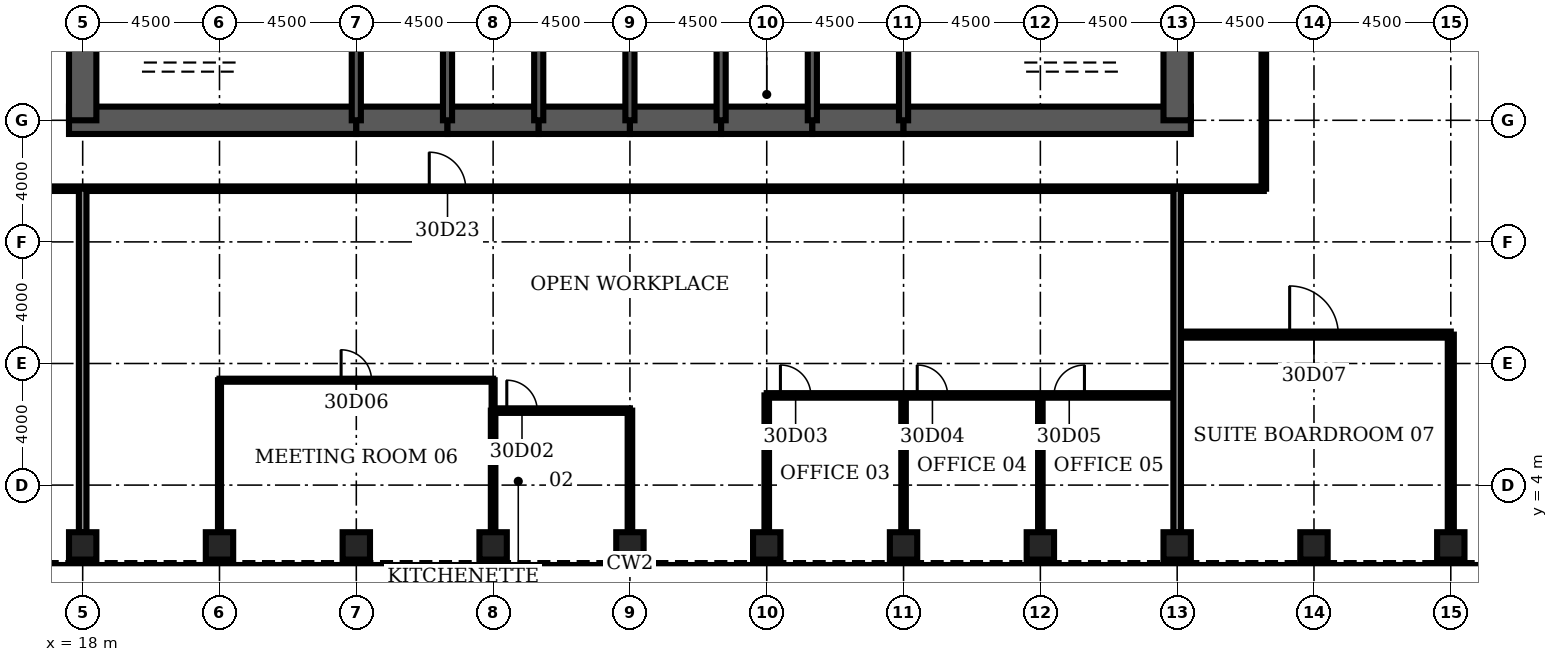
"""IFC4 building model, lengths in metres.
Left out: names, types, materials, properties, quantities, classifications, styles, units other than length and angle.
Written with IfcOpenShell. Run it as: python <this file> out.ifc"""

import sys

from ifc_helpers import new_model, si_unit, direction, frame, frame_2d, origin, origin_2d, place, context, subcontext, project, spatial, rectangle, hollow_rectangle, extrude, element, fill, save


model = new_model("IFC4")
c1 = context("Model", 3, precision=1e-05, world=origin(), true_north=direction((0.0, 1.0)))
c2 = subcontext(c1, "Body", "Model", "MODEL_VIEW")
j1 = project(units=[si_unit("LENGTHUNIT", "METRE"), si_unit("PLANEANGLEUNIT", "RADIAN")], contexts=[c1])
p1 = place(None, origin())
s1 = spatial("IfcSite", under=j1, at=p1, CompositionType="ELEMENT")
p2 = place(p1, origin())
s2 = spatial("IfcBuilding", under=s1, at=p2, CompositionType="ELEMENT")
p3 = place(p2, frame((0.0, 0.0, 138.3)))
s3 = spatial("IfcBuildingStorey", under=s2, at=p3, CompositionType="ELEMENT", Elevation=138.3)
for number, where, z_axis, x_axis in (
    (1, (18.0, 2.0, 0.0), (0.0, 0.0, 1.0), (0.0, 1.0, 0.0)),
    (2, (22.5, 2.0, 0.0), (0.0, 0.0, 1.0), (0.0, 1.0, 0.0)),
    (3, (27.0, 2.0, 0.0), (0.0, 0.0, 1.0), (0.0, 1.0, 0.0)),
    (4, (31.5, 2.0, 0.0), (0.0, 0.0, 1.0), (0.0, 1.0, 0.0)),
    (5, (36.0, 2.0, 0.0), (0.0, 0.0, 1.0), (0.0, 1.0, 0.0)),
    (6, (40.5, 2.0, 0.0), (0.0, 0.0, 1.0), (0.0, 1.0, 0.0)),
    (7, (45.0, 2.0, 0.0), (0.0, 0.0, 1.0), (0.0, 1.0, 0.0)),
    (8, (49.5, 2.0, 0.0), (0.0, 0.0, 1.0), (0.0, 1.0, 0.0)),
    (9, (54.0, 2.0, 0.0), (0.0, 0.0, 1.0), (0.0, 1.0, 0.0)),
    (10, (58.5, 2.0, 0.0), (0.0, 0.0, 1.0), (0.0, 1.0, 0.0)),
    (11, (63.0, 2.0, 0.0), (0.0, 0.0, 1.0), (0.0, 1.0, 0.0)),
):
    element("IfcColumn", number, at=place(p3, frame(where, z_axis=z_axis, x_axis=x_axis)), inside=s3, PredefinedType="COLUMN", context=c2, shape_type="SweptSolid", body=[
        extrude(hollow_rectangle(XDim=0.9, YDim=0.9, WallThickness=0.1, at=origin_2d()), origin(), (0.0, 0.0, 1.0), 4.2),
    ])
p4 = place(p3, frame((17.55, 16.0, 0.0), z_axis=(0.0, 0.0, 1.0), x_axis=(1.0, 0.0, 0.0)))
e12 = element("IfcWall", 12, at=p4, inside=s3, PredefinedType="SHEAR", context=c2, shape_type="SweptSolid", body=[
    extrude(rectangle(XDim=9.45, YDim=0.9, at=frame_2d((4.725, 0.0))), origin(), (0.0, 0.0, 1.0), 4.2),
])
for number, where, z_axis, x_axis in (
    (13, (27.0, 16.0, 0.0), (0.0, 0.0, 1.0), (1.0, 0.0, 0.0)),
    (14, (30.0, 16.0, 0.0), (0.0, 0.0, 1.0), (1.0, 0.0, 0.0)),
    (15, (33.0, 16.0, 0.0), (0.0, 0.0, 1.0), (1.0, 0.0, 0.0)),
    (16, (36.0, 16.0, 0.0), (0.0, 0.0, 1.0), (1.0, 0.0, 0.0)),
    (17, (39.0, 16.0, 0.0), (0.0, 0.0, 1.0), (1.0, 0.0, 0.0)),
    (18, (42.0, 16.0, 0.0), (0.0, 0.0, 1.0), (1.0, 0.0, 0.0)),
):
    element("IfcWall", number, at=place(p3, frame(where, z_axis=z_axis, x_axis=x_axis)), inside=s3, PredefinedType="SHEAR", context=c2, shape_type="SweptSolid", body=[
        extrude(rectangle(XDim=3.0, YDim=0.9, at=frame_2d((1.5, 0.0))), origin(), (0.0, 0.0, 1.0), 4.2),
    ])
p5 = place(p3, frame((45.0, 16.0, 0.0), z_axis=(0.0, 0.0, 1.0), x_axis=(1.0, 0.0, 0.0)))
e19 = element("IfcWall", 19, at=p5, inside=s3, PredefinedType="SHEAR", context=c2, shape_type="SweptSolid", body=[
    extrude(rectangle(XDim=9.45, YDim=0.9, at=frame_2d((4.725, 0.0))), origin(), (0.0, 0.0, 1.0), 4.2),
])
for number, where, z_axis, x_axis in (
    (20, (18.0, 19.2, 0.0), (0.0, 0.0, 1.0), (0.0, -1.0, 0.0)),
    (21, (54.0, 16.0, 0.0), (0.0, 0.0, 1.0), (0.0, 1.0, 0.0)),
):
    element("IfcWall", number, at=place(p3, frame(where, z_axis=z_axis, x_axis=x_axis)), inside=s3, PredefinedType="SHEAR", context=c2, shape_type="SweptSolid", body=[
        extrude(rectangle(XDim=3.2, YDim=0.9, at=frame_2d((1.6, 0.0))), origin(), (0.0, 0.0, 1.0), 4.2),
    ])
for number, where, z_axis, x_axis in (
    (22, (27.0, 16.0, 0.0), (0.0, 0.0, 1.0), (0.0, 1.0, 0.0)),
    (23, (30.0, 16.0, 0.0), (0.0, 0.0, 1.0), (0.0, 1.0, 0.0)),
    (24, (33.0, 16.0, 0.0), (0.0, 0.0, 1.0), (0.0, 1.0, 0.0)),
    (25, (36.0, 16.0, 0.0), (0.0, 0.0, 1.0), (0.0, 1.0, 0.0)),
    (26, (39.0, 16.0, 0.0), (0.0, 0.0, 1.0), (0.0, 1.0, 0.0)),
    (27, (42.0, 16.0, 0.0), (0.0, 0.0, 1.0), (0.0, 1.0, 0.0)),
    (28, (45.0, 16.0, 0.0), (0.0, 0.0, 1.0), (0.0, 1.0, 0.0)),
):
    element("IfcWall", number, at=place(p3, frame(where, z_axis=z_axis, x_axis=x_axis)), inside=s3, PredefinedType="SOLIDWALL", context=c2, shape_type="SweptSolid", body=[
        extrude(rectangle(XDim=3.2, YDim=0.3, at=frame_2d((1.6, 0.0))), origin(), (0.0, 0.0, 1.0), 4.2),
    ])
p6 = place(p3, frame((39.15, 17.4, 0.0), z_axis=(0.0, 0.0, 1.0), x_axis=(1.0, 0.0, 0.0)))
e29 = element("IfcWall", 29, at=p6, inside=s3, PredefinedType="SOLIDWALL", context=c2, shape_type="SweptSolid", body=[
    extrude(rectangle(XDim=2.7, YDim=0.3, at=frame_2d((1.35, 0.0))), origin(), (0.0, 0.0, 1.0), 4.04),
])
p7 = place(p6, frame((0.85, 0.0, 0.0)))
e30 = element("IfcOpeningElement", 30, at=p7, cuts=e29, PredefinedType="OPENING", context=c2, shape_type="SweptSolid", body=[
    extrude(rectangle(XDim=1.0, YDim=2.1, at=frame_2d((0.5, 1.05))), frame((0.0, 0.16, 0.0), z_axis=(0.0, -1.0, 0.0), x_axis=(1.0, 0.0, 0.0)), (0.0, 0.0, 1.0), 0.32),
])
p8 = place(p3, frame((31.5, 6.45, 0.0), z_axis=(0.0, 0.0, 1.0), x_axis=(1.0, 0.0, 0.0)))
e31 = element("IfcWall", 31, at=p8, inside=s3, PredefinedType="PARTITIONING", context=c2, shape_type="SweptSolid", body=[
    extrude(rectangle(XDim=4.5, YDim=0.15, at=frame_2d((2.25, 0.0))), origin(), (0.0, 0.0, 1.0), 3.0),
])
p9 = place(p8, frame((0.45, 0.0, 0.0)))
e32 = element("IfcOpeningElement", 32, at=p9, cuts=e31, PredefinedType="OPENING", context=c2, shape_type="SweptSolid", body=[
    extrude(rectangle(XDim=1.0, YDim=2.1, at=frame_2d((0.5, 1.05))), frame((0.0, 0.085, 0.0), z_axis=(0.0, -1.0, 0.0), x_axis=(1.0, 0.0, 0.0)), (0.0, 0.0, 1.0), 0.17),
])
p10 = place(p3, frame((40.5, 6.95, 0.0), z_axis=(0.0, 0.0, 1.0), x_axis=(1.0, 0.0, 0.0)))
e33 = element("IfcWall", 33, at=p10, inside=s3, PredefinedType="PARTITIONING", context=c2, shape_type="SweptSolid", body=[
    extrude(rectangle(XDim=13.5, YDim=0.15, at=frame_2d((6.75, 0.0))), origin(), (0.0, 0.0, 1.0), 3.0),
])
p11 = place(p10, frame((0.45, 0.0, 0.0)))
e34 = element("IfcOpeningElement", 34, at=p11, cuts=e33, PredefinedType="OPENING", context=c2, shape_type="SweptSolid", body=[
    extrude(rectangle(XDim=1.0, YDim=2.1, at=frame_2d((0.5, 1.05))), frame((0.0, 0.085, 0.0), z_axis=(0.0, -1.0, 0.0), x_axis=(1.0, 0.0, 0.0)), (0.0, 0.0, 1.0), 0.17),
])
p12 = place(p10, frame((4.95, 0.0, 0.0)))
e35 = element("IfcOpeningElement", 35, at=p12, cuts=e33, PredefinedType="OPENING", context=c2, shape_type="SweptSolid", body=[
    extrude(rectangle(XDim=1.0, YDim=2.1, at=frame_2d((0.5, 1.05))), frame((0.0, 0.085, 0.0), z_axis=(0.0, -1.0, 0.0), x_axis=(1.0, 0.0, 0.0)), (0.0, 0.0, 1.0), 0.17),
])
p13 = place(p10, frame((9.45, 0.0, 0.0)))
e36 = element("IfcOpeningElement", 36, at=p13, cuts=e33, PredefinedType="OPENING", context=c2, shape_type="SweptSolid", body=[
    extrude(rectangle(XDim=1.0, YDim=2.1, at=frame_2d((0.5, 1.05))), frame((0.0, 0.085, 0.0), z_axis=(0.0, -1.0, 0.0), x_axis=(1.0, 0.0, 0.0)), (0.0, 0.0, 1.0), 0.17),
])
p14 = place(p3, frame((22.5, 7.45, 0.0), z_axis=(0.0, 0.0, 1.0), x_axis=(1.0, 0.0, 0.0)))
e37 = element("IfcWall", 37, at=p14, inside=s3, PredefinedType="PARTITIONING", context=c2, shape_type="SweptSolid", body=[
    extrude(rectangle(XDim=9.0, YDim=0.1, at=frame_2d((4.5, 0.0))), origin(), (0.0, 0.0, 1.0), 3.0),
])
p15 = place(p14, frame((4.0, 0.0, 0.0)))
e38 = element("IfcOpeningElement", 38, at=p15, cuts=e37, PredefinedType="OPENING", context=c2, shape_type="SweptSolid", body=[
    extrude(rectangle(XDim=1.0, YDim=2.1, at=frame_2d((0.5, 1.05))), frame((0.0, 0.06, 0.0), z_axis=(0.0, -1.0, 0.0), x_axis=(1.0, 0.0, 0.0)), (0.0, 0.0, 1.0), 0.12),
])
p16 = place(p3, frame((54.0, 8.95, 0.0), z_axis=(0.0, 0.0, 1.0), x_axis=(1.0, 0.0, 0.0)))
e39 = element("IfcWall", 39, at=p16, inside=s3, PredefinedType="PARTITIONING", context=c2, shape_type="SweptSolid", body=[
    extrude(rectangle(XDim=9.0, YDim=0.2, at=frame_2d((4.5, 0.0))), origin(), (0.0, 0.0, 1.0), 3.0),
])
p17 = place(p16, frame((3.7, 0.0, 0.0)))
e40 = element("IfcOpeningElement", 40, at=p17, cuts=e39, PredefinedType="OPENING", context=c2, shape_type="SweptSolid", body=[
    extrude(rectangle(XDim=1.6, YDim=2.1, at=frame_2d((0.8, 1.05))), frame((0.0, 0.11, 0.0), z_axis=(0.0, -1.0, 0.0), x_axis=(1.0, 0.0, 0.0)), (0.0, 0.0, 1.0), 0.22),
])
p18 = place(p3, frame((15.15, 13.75, 0.0), z_axis=(0.0, 0.0, 1.0), x_axis=(1.0, 0.0, 0.0)))
e41 = element("IfcWall", 41, at=p18, inside=s3, PredefinedType="PARTITIONING", context=c2, shape_type="SweptSolid", body=[
    extrude(rectangle(XDim=41.7, YDim=0.15, at=frame_2d((20.85, 0.0))), origin(), (0.0, 0.0, 1.0), 3.0),
])
p19 = place(p18, frame((14.25, 0.0, 0.0)))
e42 = element("IfcOpeningElement", 42, at=p19, cuts=e41, PredefinedType="OPENING", context=c2, shape_type="SweptSolid", body=[
    extrude(rectangle(XDim=1.2, YDim=2.1, at=frame_2d((0.6, 1.05))), frame((0.0, 0.085, 0.0), z_axis=(0.0, -1.0, 0.0), x_axis=(1.0, 0.0, 0.0)), (0.0, 0.0, 1.0), 0.17),
])
p20 = place(p3, frame((18.0, 2.45, 0.0), z_axis=(0.0, 0.0, 1.0), x_axis=(0.0, 1.0, 0.0)))
e43 = element("IfcWall", 43, at=p20, inside=s3, PredefinedType="PARTITIONING", context=c2, shape_type="SweptSolid", body=[
    extrude(rectangle(XDim=11.3, YDim=0.25, at=frame_2d((5.65, 0.0))), origin(), (0.0, 0.0, 1.0), 3.0),
])
p21 = place(p3, frame((22.5, 2.45, 0.0), z_axis=(0.0, 0.0, 1.0), x_axis=(0.0, 1.0, 0.0)))
e44 = element("IfcWall", 44, at=p21, inside=s3, PredefinedType="PARTITIONING", context=c2, shape_type="SweptSolid", body=[
    extrude(rectangle(XDim=5.0, YDim=0.1, at=frame_2d((2.5, 0.0))), origin(), (0.0, 0.0, 1.0), 3.0),
])
p22 = place(p3, frame((31.5, 2.45, 0.0), z_axis=(0.0, 0.0, 1.0), x_axis=(0.0, 1.0, 0.0)))
e45 = element("IfcWall", 45, at=p22, inside=s3, PredefinedType="PARTITIONING", context=c2, shape_type="SweptSolid", body=[
    extrude(rectangle(XDim=4.0, YDim=0.15, at=frame_2d((2.0, 0.0))), origin(), (0.0, 0.0, 1.0), 3.0),
])
p23 = place(p3, frame((31.5, 6.45, 0.0), z_axis=(0.0, 0.0, 1.0), x_axis=(0.0, 1.0, 0.0)))
e46 = element("IfcWall", 46, at=p23, inside=s3, PredefinedType="PARTITIONING", context=c2, shape_type="SweptSolid", body=[
    extrude(rectangle(XDim=1.0, YDim=0.1, at=frame_2d((0.5, 0.0))), origin(), (0.0, 0.0, 1.0), 3.0),
])
p24 = place(p3, frame((36.0, 2.45, 0.0), z_axis=(0.0, 0.0, 1.0), x_axis=(0.0, 1.0, 0.0)))
e47 = element("IfcWall", 47, at=p24, inside=s3, PredefinedType="PARTITIONING", context=c2, shape_type="SweptSolid", body=[
    extrude(rectangle(XDim=4.0, YDim=0.15, at=frame_2d((2.0, 0.0))), origin(), (0.0, 0.0, 1.0), 3.0),
])
for number, where, z_axis, x_axis in (
    (48, (40.5, 2.45, 0.0), (0.0, 0.0, 1.0), (0.0, 1.0, 0.0)),
    (49, (45.0, 2.45, 0.0), (0.0, 0.0, 1.0), (0.0, 1.0, 0.0)),
    (50, (49.5, 2.45, 0.0), (0.0, 0.0, 1.0), (0.0, 1.0, 0.0)),
):
    element("IfcWall", number, at=place(p3, frame(where, z_axis=z_axis, x_axis=x_axis)), inside=s3, PredefinedType="PARTITIONING", context=c2, shape_type="SweptSolid", body=[
        extrude(rectangle(XDim=4.5, YDim=0.15, at=frame_2d((2.25, 0.0))), origin(), (0.0, 0.0, 1.0), 3.0),
    ])
p25 = place(p3, frame((54.0, 2.45, 0.0), z_axis=(0.0, 0.0, 1.0), x_axis=(0.0, 1.0, 0.0)))
e51 = element("IfcWall", 51, at=p25, inside=s3, PredefinedType="PARTITIONING", context=c2, shape_type="SweptSolid", body=[
    extrude(rectangle(XDim=11.3, YDim=0.25, at=frame_2d((5.65, 0.0))), origin(), (0.0, 0.0, 1.0), 3.0),
])
p26 = place(p3, frame((56.85, 13.75, 0.0), z_axis=(0.0, 0.0, 1.0), x_axis=(0.0, 1.0, 0.0)))
e52 = element("IfcWall", 52, at=p26, inside=s3, PredefinedType="PARTITIONING", context=c2, shape_type="SweptSolid", body=[
    extrude(rectangle(XDim=20.5, YDim=0.15, at=frame_2d((10.25, 0.0))), origin(), (0.0, 0.0, 1.0), 3.0),
])
p27 = place(p26, frame((9.65, 0.0, 0.0)))
e53 = element("IfcOpeningElement", 53, at=p27, cuts=e52, PredefinedType="OPENING", context=c2, shape_type="SweptSolid", body=[
    extrude(rectangle(XDim=1.2, YDim=2.1, at=frame_2d((0.6, 1.05))), frame((0.0, 0.085, 0.0), z_axis=(0.0, -1.0, 0.0), x_axis=(1.0, 0.0, 0.0)), (0.0, 0.0, 1.0), 0.17),
])
p28 = place(p3, frame((63.0, 2.45, 0.0), z_axis=(0.0, 0.0, 1.0), x_axis=(0.0, 1.0, 0.0)))
e54 = element("IfcWall", 54, at=p28, inside=s3, PredefinedType="PARTITIONING", context=c2, shape_type="SweptSolid", body=[
    extrude(rectangle(XDim=6.5, YDim=0.2, at=frame_2d((3.25, 0.0))), origin(), (0.0, 0.0, 1.0), 3.0),
])
p29 = place(p7, origin())
e55 = element("IfcDoor", 55, at=p29, inside=s3, OperationType="SINGLE_SWING_LEFT", PredefinedType="DOOR", context=c2, shape_type="SweptSolid", body=[
    extrude(rectangle(XDim=1.0, YDim=2.1, at=frame_2d((0.5, 1.05))), frame((0.0, 0.025, 0.0), z_axis=(0.0, -1.0, 0.0), x_axis=(1.0, 0.0, 0.0)), (0.0, 0.0, 1.0), 0.05),
])
fill(e30, e55)
p30 = place(p9, origin())
e56 = element("IfcDoor", 56, at=p30, inside=s3, OperationType="SINGLE_SWING_LEFT", PredefinedType="DOOR", context=c2, shape_type="SweptSolid", body=[
    extrude(rectangle(XDim=1.0, YDim=2.1, at=frame_2d((0.5, 1.05))), frame((0.0, 0.025, 0.0), z_axis=(0.0, -1.0, 0.0), x_axis=(1.0, 0.0, 0.0)), (0.0, 0.0, 1.0), 0.05),
])
fill(e32, e56)
p31 = place(p11, origin())
e57 = element("IfcDoor", 57, at=p31, inside=s3, OperationType="SINGLE_SWING_LEFT", PredefinedType="DOOR", context=c2, shape_type="SweptSolid", body=[
    extrude(rectangle(XDim=1.0, YDim=2.1, at=frame_2d((0.5, 1.05))), frame((0.0, 0.025, 0.0), z_axis=(0.0, -1.0, 0.0), x_axis=(1.0, 0.0, 0.0)), (0.0, 0.0, 1.0), 0.05),
])
fill(e34, e57)
p32 = place(p12, origin())
e58 = element("IfcDoor", 58, at=p32, inside=s3, OperationType="SINGLE_SWING_LEFT", PredefinedType="DOOR", context=c2, shape_type="SweptSolid", body=[
    extrude(rectangle(XDim=1.0, YDim=2.1, at=frame_2d((0.5, 1.05))), frame((0.0, 0.025, 0.0), z_axis=(0.0, -1.0, 0.0), x_axis=(1.0, 0.0, 0.0)), (0.0, 0.0, 1.0), 0.05),
])
fill(e35, e58)
p33 = place(p13, origin())
e59 = element("IfcDoor", 59, at=p33, inside=s3, OperationType="SINGLE_SWING_RIGHT", PredefinedType="DOOR", context=c2, shape_type="SweptSolid", body=[
    extrude(rectangle(XDim=1.0, YDim=2.1, at=frame_2d((0.5, 1.05))), frame((0.0, 0.025, 0.0), z_axis=(0.0, -1.0, 0.0), x_axis=(1.0, 0.0, 0.0)), (0.0, 0.0, 1.0), 0.05),
])
fill(e36, e59)
p34 = place(p15, origin())
e60 = element("IfcDoor", 60, at=p34, inside=s3, OperationType="SINGLE_SWING_LEFT", PredefinedType="DOOR", context=c2, shape_type="SweptSolid", body=[
    extrude(rectangle(XDim=1.0, YDim=2.1, at=frame_2d((0.5, 1.05))), frame((0.0, 0.025, 0.0), z_axis=(0.0, -1.0, 0.0), x_axis=(1.0, 0.0, 0.0)), (0.0, 0.0, 1.0), 0.05),
])
fill(e38, e60)
p35 = place(p17, origin())
e61 = element("IfcDoor", 61, at=p35, inside=s3, OperationType="SINGLE_SWING_LEFT", PredefinedType="DOOR", context=c2, shape_type="SweptSolid", body=[
    extrude(rectangle(XDim=1.6, YDim=2.1, at=frame_2d((0.8, 1.05))), frame((0.0, 0.025, 0.0), z_axis=(0.0, -1.0, 0.0), x_axis=(1.0, 0.0, 0.0)), (0.0, 0.0, 1.0), 0.05),
])
fill(e40, e61)
p36 = place(p19, origin())
e62 = element("IfcDoor", 62, at=p36, inside=s3, OperationType="SINGLE_SWING_LEFT", PredefinedType="DOOR", context=c2, shape_type="SweptSolid", body=[
    extrude(rectangle(XDim=1.2, YDim=2.1, at=frame_2d((0.6, 1.05))), frame((0.0, 0.025, 0.0), z_axis=(0.0, -1.0, 0.0), x_axis=(1.0, 0.0, 0.0)), (0.0, 0.0, 1.0), 0.05),
])
fill(e42, e62)
save(model, sys.argv[1])
